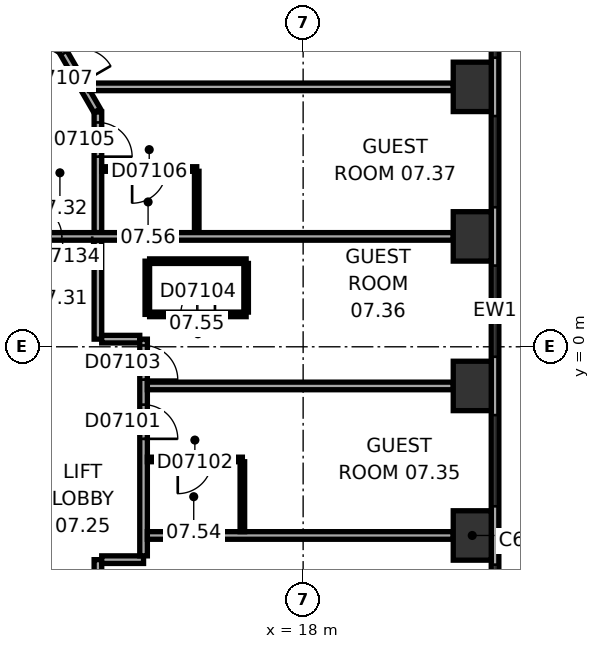
"""IFC4 building model, lengths in metres.
Left out: names, types, materials, properties, quantities, classifications, styles, units other than length and angle.
Written with IfcOpenShell. Run it as: python <this file> out.ifc"""

import sys

from ifc_helpers import new_model, si_unit, direction, frame, frame_2d, origin, origin_2d, place, context, subcontext, project, spatial, rectangle, extrude, element, fill, save


model = new_model("IFC4")
c1 = context("Model", 3, precision=1e-05, world=origin(), true_north=direction((0.0, 1.0)))
c2 = subcontext(c1, "Body", "Model", "MODEL_VIEW")
j1 = project(units=[si_unit("LENGTHUNIT", "METRE"), si_unit("PLANEANGLEUNIT", "RADIAN")], contexts=[c1])
p1 = place(None, origin())
s1 = spatial("IfcSite", under=j1, at=p1, CompositionType="ELEMENT")
p2 = place(p1, origin())
s2 = spatial("IfcBuilding", under=s1, at=p2, CompositionType="ELEMENT")
p3 = place(p2, frame((0.0, 0.0, 44.0)))
s3 = spatial("IfcBuildingStorey", under=s2, at=p3, CompositionType="ELEMENT", Elevation=44.0)
for number, where, z_axis, x_axis in (
    (1, (22.45, -4.965, 0.0), (0.0, 0.0, 1.0), (0.0, 1.0, 0.0)),
    (2, (22.45, -1.03, 0.0), (0.0, 0.0, 1.0), (0.0, 1.0, 0.0)),
    (3, (22.45, 2.905, 0.0), (0.0, 0.0, 1.0), (0.0, 1.0, 0.0)),
    (4, (22.45, 6.839, 0.0), (0.0, 0.0, 1.0), (0.0, 1.0, 0.0)),
):
    element("IfcColumn", number, at=place(p3, frame(where, z_axis=z_axis, x_axis=x_axis)), inside=s3, PredefinedType="COLUMN", context=c2, shape_type="SweptSolid", body=[
        extrude(rectangle(XDim=1.3, YDim=1.0, at=origin_2d()), origin(), (0.0, 0.0, 1.0), 3.3),
    ])
p4 = place(p3, frame((23.05, -9.687, 0.0), z_axis=(0.0, 0.0, 1.0), x_axis=(0.0, 1.0, 0.0)))
e5 = element("IfcWall", 5, at=p4, inside=s3, PredefinedType="STANDARD", context=c2, shape_type="SweptSolid", body=[
    extrude(rectangle(XDim=21.246, YDim=0.2, at=frame_2d((10.623, 0.0))), origin(), (0.0, 0.0, 1.0), 3.3),
])
p5 = place(p4, frame((1.555, 0.0, 0.8)))
e6 = element("IfcOpeningElement", 6, at=p5, cuts=e5, PredefinedType="OPENING", context=c2, shape_type="SweptSolid", body=[
    extrude(rectangle(XDim=2.4, YDim=1.7, at=frame_2d((1.2, 0.85))), frame((0.0, 0.11, 0.0), z_axis=(0.0, -1.0, 0.0), x_axis=(1.0, 0.0, 0.0)), (0.0, 0.0, 1.0), 0.22),
])
p6 = place(p4, frame((5.489, 0.0, 0.8)))
e7 = element("IfcOpeningElement", 7, at=p6, cuts=e5, PredefinedType="OPENING", context=c2, shape_type="SweptSolid", body=[
    extrude(rectangle(XDim=2.4, YDim=1.7, at=frame_2d((1.2, 0.85))), frame((0.0, 0.11, 0.0), z_axis=(0.0, -1.0, 0.0), x_axis=(1.0, 0.0, 0.0)), (0.0, 0.0, 1.0), 0.22),
])
p7 = place(p4, frame((9.424, 0.0, 0.8)))
e8 = element("IfcOpeningElement", 8, at=p7, cuts=e5, PredefinedType="OPENING", context=c2, shape_type="SweptSolid", body=[
    extrude(rectangle(XDim=2.4, YDim=1.7, at=frame_2d((1.2, 0.85))), frame((0.0, 0.11, 0.0), z_axis=(0.0, -1.0, 0.0), x_axis=(1.0, 0.0, 0.0)), (0.0, 0.0, 1.0), 0.22),
])
p8 = place(p4, frame((13.358, 0.0, 0.8)))
e9 = element("IfcOpeningElement", 9, at=p8, cuts=e5, PredefinedType="OPENING", context=c2, shape_type="SweptSolid", body=[
    extrude(rectangle(XDim=2.4, YDim=1.7, at=frame_2d((1.2, 0.85))), frame((0.0, 0.11, 0.0), z_axis=(0.0, -1.0, 0.0), x_axis=(1.0, 0.0, 0.0)), (0.0, 0.0, 1.0), 0.22),
])
p9 = place(p4, frame((17.293, 0.0, 0.8)))
e10 = element("IfcOpeningElement", 10, at=p9, cuts=e5, PredefinedType="OPENING", context=c2, shape_type="SweptSolid", body=[
    extrude(rectangle(XDim=2.4, YDim=1.7, at=frame_2d((1.2, 0.85))), frame((0.0, 0.11, 0.0), z_axis=(0.0, -1.0, 0.0), x_axis=(1.0, 0.0, 0.0)), (0.0, 0.0, 1.0), 0.22),
])
p10 = place(p3, frame((12.58, 6.212, 0.0), z_axis=(0.0, 0.0, 1.0), x_axis=(-0.500063286585, 0.865988862174, 0.0)))
e11 = element("IfcWall", 11, at=p10, inside=s3, PredefinedType="PARTITIONING", context=c2, shape_type="SweptSolid", body=[
    extrude(rectangle(XDim=1.86, YDim=0.2, at=frame_2d((0.93, 0.0))), origin(), (0.0, 0.0, 1.0), 3.05),
])
p11 = place(p10, frame((0.842, 0.0, 0.0)))
e12 = element("IfcOpeningElement", 12, at=p11, cuts=e11, PredefinedType="OPENING", context=c2, shape_type="SweptSolid", body=[
    extrude(rectangle(XDim=0.9, YDim=2.1, at=frame_2d((0.45, 1.05))), frame((0.0, 0.11, 0.0), z_axis=(0.0, -1.0, 0.0), x_axis=(1.0, 0.0, 0.0)), (0.0, 0.0, 1.0), 0.22),
])
p12 = place(p3, frame((12.6, -6.138, 0.0), z_axis=(0.0, 0.0, 1.0), x_axis=(0.0, 1.0, 0.0)))
e13 = element("IfcWall", 13, at=p12, inside=s3, PredefinedType="PARTITIONING", context=c2, shape_type="SweptSolid", body=[
    extrude(rectangle(XDim=0.537, YDim=0.2, at=frame_2d((0.268, 0.0))), origin(), (0.0, 0.0, 1.0), 3.05),
])
p13 = place(p3, frame((12.6, 0.201, 0.0), z_axis=(0.0, 0.0, 1.0), x_axis=(0.0, 1.0, 0.0)))
e14 = element("IfcWall", 14, at=p13, inside=s3, PredefinedType="PARTITIONING", context=c2, shape_type="SweptSolid", body=[
    extrude(rectangle(XDim=2.604, YDim=0.2, at=frame_2d((1.302, 0.0))), origin(), (0.0, 0.0, 1.0), 3.05),
])
p14 = place(p3, frame((12.6, 3.004, 0.0), z_axis=(0.0, 0.0, 1.0), x_axis=(0.0, 1.0, 0.0)))
e15 = element("IfcWall", 15, at=p14, inside=s3, PredefinedType="PARTITIONING", context=c2, shape_type="SweptSolid", body=[
    extrude(rectangle(XDim=3.173, YDim=0.2, at=frame_2d((1.586, 0.0))), origin(), (0.0, 0.0, 1.0), 3.05),
])
p15 = place(p14, frame((1.998, 0.0, 0.0)))
e16 = element("IfcOpeningElement", 16, at=p15, cuts=e15, PredefinedType="OPENING", context=c2, shape_type="SweptSolid", body=[
    extrude(rectangle(XDim=0.9, YDim=2.1, at=frame_2d((0.45, 1.05))), frame((0.0, 0.11, 0.0), z_axis=(0.0, -1.0, 0.0), x_axis=(1.0, 0.0, 0.0)), (0.0, 0.0, 1.0), 0.22),
])
p16 = place(p3, frame((12.7, -5.601, 0.0), z_axis=(0.0, 0.0, 1.0), x_axis=(1.0, 0.0, 0.0)))
e17 = element("IfcWall", 17, at=p16, inside=s3, PredefinedType="PARTITIONING", context=c2, shape_type="SweptSolid", body=[
    extrude(rectangle(XDim=1.101, YDim=0.2, at=frame_2d((0.551, 0.0))), origin(), (0.0, 0.0, 1.0), 3.05),
])
p17 = place(p3, frame((12.7, 4.677, 0.0), z_axis=(0.0, 0.0, 1.0), x_axis=(1.0, 0.0, 0.0)))
e18 = element("IfcWall", 18, at=p17, inside=s3, PredefinedType="PARTITIONING", context=c2, shape_type="SweptSolid", body=[
    extrude(rectangle(XDim=2.5, YDim=0.12, at=frame_2d((1.25, 0.0))), origin(), (0.0, 0.0, 1.0), 3.05),
])
p18 = place(p17, frame((0.8, 0.0, 0.0)))
e19 = element("IfcOpeningElement", 19, at=p18, cuts=e18, PredefinedType="OPENING", context=c2, shape_type="SweptSolid", body=[
    extrude(rectangle(XDim=0.9, YDim=2.1, at=frame_2d((0.45, 1.05))), frame((0.0, 0.07, 0.0), z_axis=(0.0, -1.0, 0.0), x_axis=(1.0, 0.0, 0.0)), (0.0, 0.0, 1.0), 0.14),
])
p19 = place(p3, frame((13.701, 0.201, 0.0), z_axis=(0.0, 0.0, 1.0), x_axis=(-1.0, 0.0, 0.0)))
e20 = element("IfcWall", 20, at=p19, inside=s3, PredefinedType="PARTITIONING", context=c2, shape_type="SweptSolid", body=[
    extrude(rectangle(XDim=1.001, YDim=0.2, at=frame_2d((0.5, 0.0))), origin(), (0.0, 0.0, 1.0), 3.05),
])
p20 = place(p3, frame((13.801, -5.501, 0.0), z_axis=(0.0, 0.0, 1.0), x_axis=(0.0, 1.0, 0.0)))
e21 = element("IfcWall", 21, at=p20, inside=s3, PredefinedType="PARTITIONING", context=c2, shape_type="SweptSolid", body=[
    extrude(rectangle(XDim=5.702, YDim=0.2, at=frame_2d((2.851, 0.0))), origin(), (0.0, 0.0, 1.0), 3.05),
])
p21 = place(p20, frame((3.079, 0.0, 0.0)))
e22 = element("IfcOpeningElement", 22, at=p21, cuts=e21, PredefinedType="OPENING", context=c2, shape_type="SweptSolid", body=[
    extrude(rectangle(XDim=0.9, YDim=2.1, at=frame_2d((0.45, 1.05))), frame((0.0, 0.11, 0.0), z_axis=(0.0, -1.0, 0.0), x_axis=(1.0, 0.0, 0.0)), (0.0, 0.0, 1.0), 0.22),
])
p22 = place(p20, frame((4.636, 0.0, 0.0)))
e23 = element("IfcOpeningElement", 23, at=p22, cuts=e21, PredefinedType="OPENING", context=c2, shape_type="SweptSolid", body=[
    extrude(rectangle(XDim=0.9, YDim=2.1, at=frame_2d((0.45, 1.05))), frame((0.0, 0.11, 0.0), z_axis=(0.0, -1.0, 0.0), x_axis=(1.0, 0.0, 0.0)), (0.0, 0.0, 1.0), 0.22),
])
p23 = place(p3, frame((13.901, -4.965, 0.0), z_axis=(0.0, 0.0, 1.0), x_axis=(1.0, 0.0, 0.0)))
e24 = element("IfcWall", 24, at=p23, inside=s3, PredefinedType="PARTITIONING", context=c2, shape_type="SweptSolid", body=[
    extrude(rectangle(XDim=8.049, YDim=0.2, at=frame_2d((4.024, 0.0))), origin(), (0.0, 0.0, 1.0), 3.05),
])
p24 = place(p3, frame((13.901, -2.965, 0.0), z_axis=(0.0, 0.0, 1.0), x_axis=(1.0, 0.0, 0.0)))
e25 = element("IfcWall", 25, at=p24, inside=s3, PredefinedType="PARTITIONING", context=c2, shape_type="SweptSolid", body=[
    extrude(rectangle(XDim=2.5, YDim=0.12, at=frame_2d((1.25, 0.0))), origin(), (0.0, 0.0, 1.0), 3.05),
])
p25 = place(p24, frame((0.8, 0.0, 0.0)))
e26 = element("IfcOpeningElement", 26, at=p25, cuts=e25, PredefinedType="OPENING", context=c2, shape_type="SweptSolid", body=[
    extrude(rectangle(XDim=0.9, YDim=2.1, at=frame_2d((0.45, 1.05))), frame((0.0, 0.07, 0.0), z_axis=(0.0, -1.0, 0.0), x_axis=(1.0, 0.0, 0.0)), (0.0, 0.0, 1.0), 0.14),
])
p26 = place(p3, frame((13.9, 0.853, 0.0), z_axis=(0.0, 0.0, 1.0), x_axis=(0.0, 1.0, 0.0)))
e27 = element("IfcWall", 27, at=p26, inside=s3, PredefinedType="PARTITIONING", context=c2, shape_type="SweptSolid", body=[
    extrude(rectangle(XDim=1.4, YDim=0.12, at=frame_2d((0.7, 0.0))), origin(), (0.0, 0.0, 1.0), 3.05),
])
p27 = place(p3, frame((13.96, 2.253, 0.0), z_axis=(0.0, 0.0, 1.0), x_axis=(1.0, 0.0, 0.0)))
e28 = element("IfcWall", 28, at=p27, inside=s3, PredefinedType="PARTITIONING", context=c2, shape_type="SweptSolid", body=[
    extrude(rectangle(XDim=2.54, YDim=0.12, at=frame_2d((1.27, 0.0))), origin(), (0.0, 0.0, 1.0), 3.05),
])
p28 = place(p3, frame((15.2, 4.618, 0.0), z_axis=(0.0, 0.0, 1.0), x_axis=(0.0, -1.0, 0.0)))
e29 = element("IfcWall", 29, at=p28, inside=s3, PredefinedType="PARTITIONING", context=c2, shape_type="SweptSolid", body=[
    extrude(rectangle(XDim=1.613, YDim=0.12, at=frame_2d((0.807, 0.0))), origin(), (0.0, 0.0, 1.0), 3.05),
])
p29 = place(p3, frame((16.401, -3.025, 0.0), z_axis=(0.0, 0.0, 1.0), x_axis=(0.0, -1.0, 0.0)))
e30 = element("IfcWall", 30, at=p29, inside=s3, PredefinedType="PARTITIONING", context=c2, shape_type="SweptSolid", body=[
    extrude(rectangle(XDim=1.84, YDim=0.12, at=frame_2d((0.92, 0.0))), origin(), (0.0, 0.0, 1.0), 3.05),
])
p30 = place(p3, frame((16.5, 0.853, 0.0), z_axis=(0.0, 0.0, 1.0), x_axis=(-1.0, 0.0, 0.0)))
e31 = element("IfcWall", 31, at=p30, inside=s3, PredefinedType="PARTITIONING", context=c2, shape_type="SweptSolid", body=[
    extrude(rectangle(XDim=2.54, YDim=0.12, at=frame_2d((1.27, 0.0))), origin(), (0.0, 0.0, 1.0), 3.05),
])
p31 = place(p30, frame((0.82, 0.0, 0.0)))
e32 = element("IfcOpeningElement", 32, at=p31, cuts=e31, PredefinedType="OPENING", context=c2, shape_type="SweptSolid", body=[
    extrude(rectangle(XDim=0.9, YDim=2.1, at=frame_2d((0.45, 1.05))), frame((0.0, 0.07, 0.0), z_axis=(0.0, -1.0, 0.0), x_axis=(1.0, 0.0, 0.0)), (0.0, 0.0, 1.0), 0.14),
])
p32 = place(p3, frame((16.5, 2.193, 0.0), z_axis=(0.0, 0.0, 1.0), x_axis=(0.0, -1.0, 0.0)))
e33 = element("IfcWall", 33, at=p32, inside=s3, PredefinedType="PARTITIONING", context=c2, shape_type="SweptSolid", body=[
    extrude(rectangle(XDim=1.28, YDim=0.12, at=frame_2d((0.64, 0.0))), origin(), (0.0, 0.0, 1.0), 3.05),
])
p33 = place(p3, frame((21.95, -1.03, 0.0), z_axis=(0.0, 0.0, 1.0), x_axis=(-1.0, 0.0, 0.0)))
e34 = element("IfcWall", 34, at=p33, inside=s3, PredefinedType="PARTITIONING", context=c2, shape_type="SweptSolid", body=[
    extrude(rectangle(XDim=8.049, YDim=0.2, at=frame_2d((4.024, 0.0))), origin(), (0.0, 0.0, 1.0), 2.6),
])
p34 = place(p3, frame((21.95, 2.905, 0.0), z_axis=(0.0, 0.0, 1.0), x_axis=(-1.0, 0.0, 0.0)))
e35 = element("IfcWall", 35, at=p34, inside=s3, PredefinedType="PARTITIONING", context=c2, shape_type="SweptSolid", body=[
    extrude(rectangle(XDim=11.25, YDim=0.2, at=frame_2d((5.625, 0.0))), origin(), (0.0, 0.0, 1.0), 3.05),
])
p35 = place(p34, frame((9.5, 0.0, 0.0)))
e36 = element("IfcOpeningElement", 36, at=p35, cuts=e35, PredefinedType="OPENING", context=c2, shape_type="SweptSolid", body=[
    extrude(rectangle(XDim=1.6, YDim=2.1, at=frame_2d((0.8, 1.05))), frame((0.0, 0.11, 0.0), z_axis=(0.0, -1.0, 0.0), x_axis=(1.0, 0.0, 0.0)), (0.0, 0.0, 1.0), 0.22),
])
p36 = place(p3, frame((21.95, 6.839, 0.0), z_axis=(0.0, 0.0, 1.0), x_axis=(-1.0, 0.0, 0.0)))
e37 = element("IfcWall", 37, at=p36, inside=s3, PredefinedType="PARTITIONING", context=c2, shape_type="SweptSolid", body=[
    extrude(rectangle(XDim=9.572, YDim=0.2, at=frame_2d((4.786, 0.0))), origin(), (0.0, 0.0, 1.0), 3.05),
])
p37 = place(p5, origin())
e38 = element("IfcWindow", 38, at=p37, inside=s3, PartitioningType="SINGLE_PANEL", PredefinedType="WINDOW", context=c2, shape_type="SweptSolid", body=[
    extrude(rectangle(XDim=2.4, YDim=1.7, at=frame_2d((1.2, 0.85))), frame((0.0, 0.03, 0.0), z_axis=(0.0, -1.0, 0.0), x_axis=(1.0, 0.0, 0.0)), (0.0, 0.0, 1.0), 0.06),
])
fill(e6, e38)
p38 = place(p6, origin())
e39 = element("IfcWindow", 39, at=p38, inside=s3, PartitioningType="SINGLE_PANEL", PredefinedType="WINDOW", context=c2, shape_type="SweptSolid", body=[
    extrude(rectangle(XDim=2.4, YDim=1.7, at=frame_2d((1.2, 0.85))), frame((0.0, 0.03, 0.0), z_axis=(0.0, -1.0, 0.0), x_axis=(1.0, 0.0, 0.0)), (0.0, 0.0, 1.0), 0.06),
])
fill(e7, e39)
p39 = place(p7, origin())
e40 = element("IfcWindow", 40, at=p39, inside=s3, PartitioningType="SINGLE_PANEL", PredefinedType="WINDOW", context=c2, shape_type="SweptSolid", body=[
    extrude(rectangle(XDim=2.4, YDim=1.7, at=frame_2d((1.2, 0.85))), frame((0.0, 0.03, 0.0), z_axis=(0.0, -1.0, 0.0), x_axis=(1.0, 0.0, 0.0)), (0.0, 0.0, 1.0), 0.06),
])
fill(e8, e40)
p40 = place(p8, origin())
e41 = element("IfcWindow", 41, at=p40, inside=s3, PartitioningType="SINGLE_PANEL", PredefinedType="WINDOW", context=c2, shape_type="SweptSolid", body=[
    extrude(rectangle(XDim=2.4, YDim=1.7, at=frame_2d((1.2, 0.85))), frame((0.0, 0.03, 0.0), z_axis=(0.0, -1.0, 0.0), x_axis=(1.0, 0.0, 0.0)), (0.0, 0.0, 1.0), 0.06),
])
fill(e9, e41)
p41 = place(p9, origin())
e42 = element("IfcWindow", 42, at=p41, inside=s3, PartitioningType="SINGLE_PANEL", PredefinedType="WINDOW", context=c2, shape_type="SweptSolid", body=[
    extrude(rectangle(XDim=2.4, YDim=1.7, at=frame_2d((1.2, 0.85))), frame((0.0, 0.03, 0.0), z_axis=(0.0, -1.0, 0.0), x_axis=(1.0, 0.0, 0.0)), (0.0, 0.0, 1.0), 0.06),
])
fill(e10, e42)
p42 = place(p21, origin())
e43 = element("IfcDoor", 43, at=p42, inside=s3, OperationType="SINGLE_SWING_LEFT", PredefinedType="DOOR", context=c2, shape_type="SweptSolid", body=[
    extrude(rectangle(XDim=0.9, YDim=2.1, at=frame_2d((0.45, 1.05))), frame((0.0, 0.025, 0.0), z_axis=(0.0, -1.0, 0.0), x_axis=(1.0, 0.0, 0.0)), (0.0, 0.0, 1.0), 0.05),
])
fill(e22, e43)
p43 = place(p25, origin())
e44 = element("IfcDoor", 44, at=p43, inside=s3, OperationType="SINGLE_SWING_LEFT", PredefinedType="DOOR", context=c2, shape_type="SweptSolid", body=[
    extrude(rectangle(XDim=0.9, YDim=2.1, at=frame_2d((0.45, 1.05))), frame((0.0, 0.025, 0.0), z_axis=(0.0, -1.0, 0.0), x_axis=(1.0, 0.0, 0.0)), (0.0, 0.0, 1.0), 0.05),
])
fill(e26, e44)
p44 = place(p22, origin())
e45 = element("IfcDoor", 45, at=p44, inside=s3, OperationType="SINGLE_SWING_LEFT", PredefinedType="DOOR", context=c2, shape_type="SweptSolid", body=[
    extrude(rectangle(XDim=0.9, YDim=2.1, at=frame_2d((0.45, 1.05))), frame((0.0, 0.025, 0.0), z_axis=(0.0, -1.0, 0.0), x_axis=(1.0, 0.0, 0.0)), (0.0, 0.0, 1.0), 0.05),
])
fill(e23, e45)
p45 = place(p31, origin())
e46 = element("IfcDoor", 46, at=p45, inside=s3, OperationType="SINGLE_SWING_LEFT", PredefinedType="DOOR", context=c2, shape_type="SweptSolid", body=[
    extrude(rectangle(XDim=0.9, YDim=2.1, at=frame_2d((0.45, 1.05))), frame((0.0, 0.025, 0.0), z_axis=(0.0, -1.0, 0.0), x_axis=(1.0, 0.0, 0.0)), (0.0, 0.0, 1.0), 0.05),
])
fill(e32, e46)
p46 = place(p15, origin())
e47 = element("IfcDoor", 47, at=p46, inside=s3, OperationType="SINGLE_SWING_LEFT", PredefinedType="DOOR", context=c2, shape_type="SweptSolid", body=[
    extrude(rectangle(XDim=0.9, YDim=2.1, at=frame_2d((0.45, 1.05))), frame((0.0, 0.025, 0.0), z_axis=(0.0, -1.0, 0.0), x_axis=(1.0, 0.0, 0.0)), (0.0, 0.0, 1.0), 0.05),
])
fill(e16, e47)
p47 = place(p18, origin())
e48 = element("IfcDoor", 48, at=p47, inside=s3, OperationType="SINGLE_SWING_LEFT", PredefinedType="DOOR", context=c2, shape_type="SweptSolid", body=[
    extrude(rectangle(XDim=0.9, YDim=2.1, at=frame_2d((0.45, 1.05))), frame((0.0, 0.025, 0.0), z_axis=(0.0, -1.0, 0.0), x_axis=(1.0, 0.0, 0.0)), (0.0, 0.0, 1.0), 0.05),
])
fill(e19, e48)
p48 = place(p11, origin())
e49 = element("IfcDoor", 49, at=p48, inside=s3, OperationType="SINGLE_SWING_LEFT", PredefinedType="DOOR", context=c2, shape_type="SweptSolid", body=[
    extrude(rectangle(XDim=0.9, YDim=2.1, at=frame_2d((0.45, 1.05))), frame((0.0, 0.025, 0.0), z_axis=(0.0, -1.0, 0.0), x_axis=(1.0, 0.0, 0.0)), (0.0, 0.0, 1.0), 0.05),
])
fill(e12, e49)
p49 = place(p35, origin())
e50 = element("IfcDoor", 50, at=p49, inside=s3, OperationType="DOUBLE_DOOR_SINGLE_SWING", PredefinedType="DOOR", context=c2, shape_type="SweptSolid", body=[
    extrude(rectangle(XDim=1.6, YDim=2.1, at=frame_2d((0.8, 1.05))), frame((0.0, 0.025, 0.0), z_axis=(0.0, -1.0, 0.0), x_axis=(1.0, 0.0, 0.0)), (0.0, 0.0, 1.0), 0.05),
])
fill(e36, e50)
save(model, sys.argv[1])
